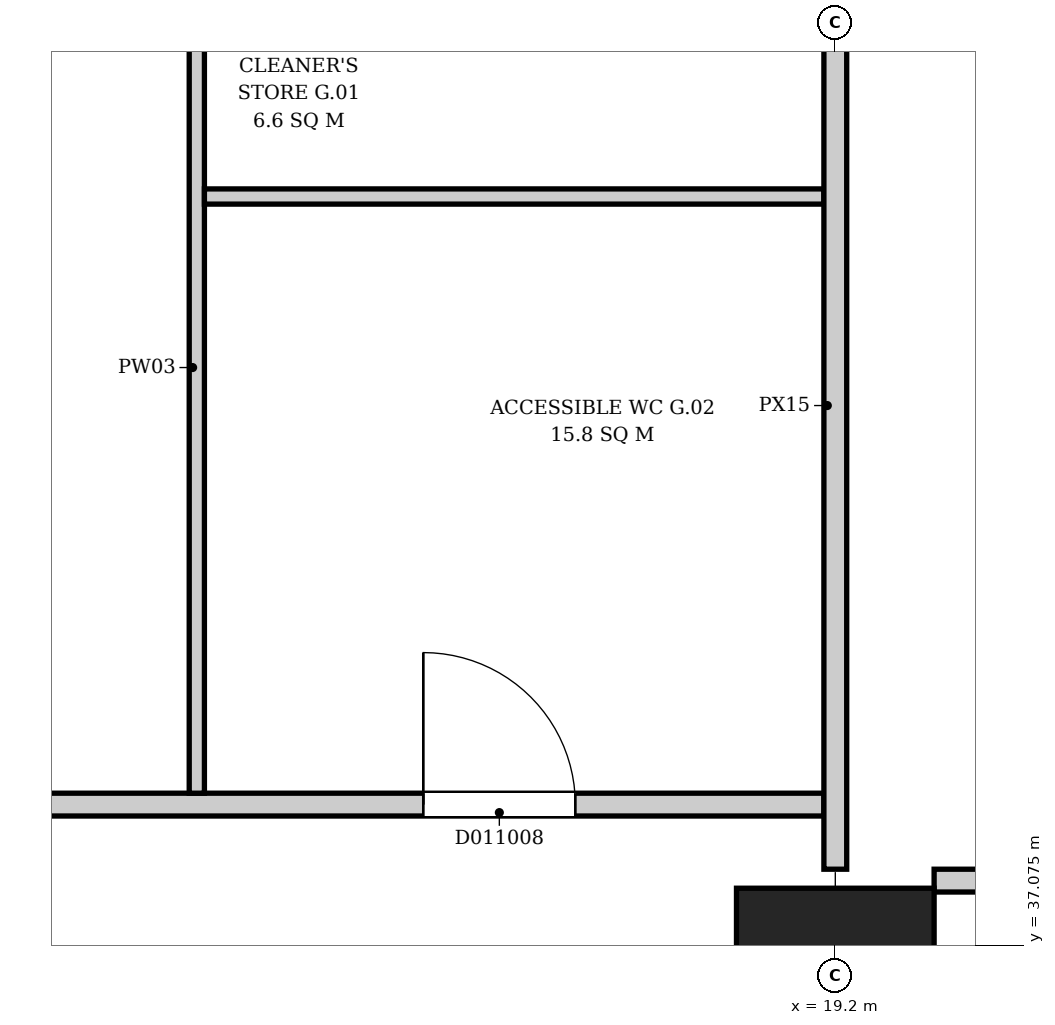
"""IFC4 building model, lengths in metres.
Left out: names, types, materials, properties, quantities, classifications, styles, units other than length and angle.
Written with IfcOpenShell. Run it as: python <this file> out.ifc"""

import sys

from ifc_helpers import new_model, si_unit, direction, frame, frame_2d, origin, origin_2d, place, context, subcontext, project, spatial, rectangle, extrude, element, fill, save


model = new_model("IFC4")
c1 = context("Model", 3, precision=1e-05, world=origin(), true_north=direction((0.0, 1.0)))
c2 = subcontext(c1, "Body", "Model", "MODEL_VIEW")
j1 = project(units=[si_unit("LENGTHUNIT", "METRE"), si_unit("PLANEANGLEUNIT", "RADIAN")], contexts=[c1])
p1 = place(None, origin())
s1 = spatial("IfcSite", under=j1, at=p1, CompositionType="ELEMENT")
p2 = place(p1, origin())
s2 = spatial("IfcBuilding", under=s1, at=p2, CompositionType="ELEMENT")
p3 = place(p2, origin())
s3 = spatial("IfcBuildingStorey", under=s2, at=p3, CompositionType="ELEMENT", Elevation=0.0)
p4 = place(p3, frame((19.2, 36.8, 0.0), z_axis=(0.0, 0.0, 1.0), x_axis=(1.0, 0.0, 0.0)))
e1 = element("IfcColumn", 1, at=p4, inside=s3, PredefinedType="COLUMN", context=c2, shape_type="SweptSolid", body=[
    extrude(rectangle(XDim=1.3, YDim=1.3, at=origin_2d()), origin(), (0.0, 0.0, 1.0), 6.5),
])
p5 = place(p3, frame((8.906, 38.0, 0.0), z_axis=(0.0, 0.0, 1.0), x_axis=(1.0, 0.0, 0.0)))
e2 = element("IfcWall", 2, at=p5, inside=s3, PredefinedType="PARTITIONING", context=c2, shape_type="SweptSolid", body=[
    extrude(rectangle(XDim=10.219, YDim=0.15, at=frame_2d((5.109, 0.0))), origin(), (0.0, 0.0, 1.0), 6.15),
])
p6 = place(p5, frame((7.584, 0.0, 0.0)))
e3 = element("IfcOpeningElement", 3, at=p6, cuts=e2, PredefinedType="OPENING", context=c2, shape_type="SweptSolid", body=[
    extrude(rectangle(XDim=1.0, YDim=2.1, at=frame_2d((0.5, 1.05))), frame((0.0, 0.085, 0.0), z_axis=(0.0, -1.0, 0.0), x_axis=(1.0, 0.0, 0.0)), (0.0, 0.0, 1.0), 0.17),
])
p7 = place(p3, frame((15.0, 38.075, 0.0), z_axis=(0.0, 0.0, 1.0), x_axis=(0.0, 1.0, 0.0)))
e4 = element("IfcWall", 4, at=p7, inside=s3, PredefinedType="PARTITIONING", context=c2, shape_type="SweptSolid", body=[
    extrude(rectangle(XDim=5.6, YDim=0.1, at=frame_2d((2.8, 0.0))), origin(), (0.0, 0.0, 1.0), 6.15),
])
p8 = place(p3, frame((15.05, 42.0, 0.0), z_axis=(0.0, 0.0, 1.0), x_axis=(1.0, 0.0, 0.0)))
e5 = element("IfcWall", 5, at=p8, inside=s3, PredefinedType="PARTITIONING", context=c2, shape_type="SweptSolid", body=[
    extrude(rectangle(XDim=4.075, YDim=0.1, at=frame_2d((2.038, 0.0))), origin(), (0.0, 0.0, 1.0), 6.15),
])
p9 = place(p3, frame((19.2, 37.575, 0.0), z_axis=(0.0, 0.0, 1.0), x_axis=(0.0, 1.0, 0.0)))
e6 = element("IfcWall", 6, at=p9, inside=s3, PredefinedType="PARTITIONING", context=c2, shape_type="SweptSolid", body=[
    extrude(rectangle(XDim=6.1, YDim=0.15, at=frame_2d((3.05, 0.0))), origin(), (0.0, 0.0, 1.0), 5.75),
])
p10 = place(p3, frame((19.85, 37.5, 0.0), z_axis=(0.0, 0.0, 1.0), x_axis=(1.0, 0.0, 0.0)))
e7 = element("IfcWall", 7, at=p10, inside=s3, PredefinedType="PARTITIONING", context=c2, shape_type="SweptSolid", body=[
    extrude(rectangle(XDim=3.944, YDim=0.15, at=frame_2d((1.972, 0.0))), origin(), (0.0, 0.0, 1.0), 6.15),
])
p11 = place(p6, origin())
e8 = element("IfcDoor", 8, at=p11, inside=s3, OperationType="SINGLE_SWING_RIGHT", PredefinedType="DOOR", context=c2, shape_type="SweptSolid", body=[
    extrude(rectangle(XDim=1.0, YDim=2.1, at=frame_2d((0.5, 1.05))), frame((0.0, 0.025, 0.0), z_axis=(0.0, -1.0, 0.0), x_axis=(1.0, 0.0, 0.0)), (0.0, 0.0, 1.0), 0.05),
])
fill(e3, e8)
save(model, sys.argv[1])
